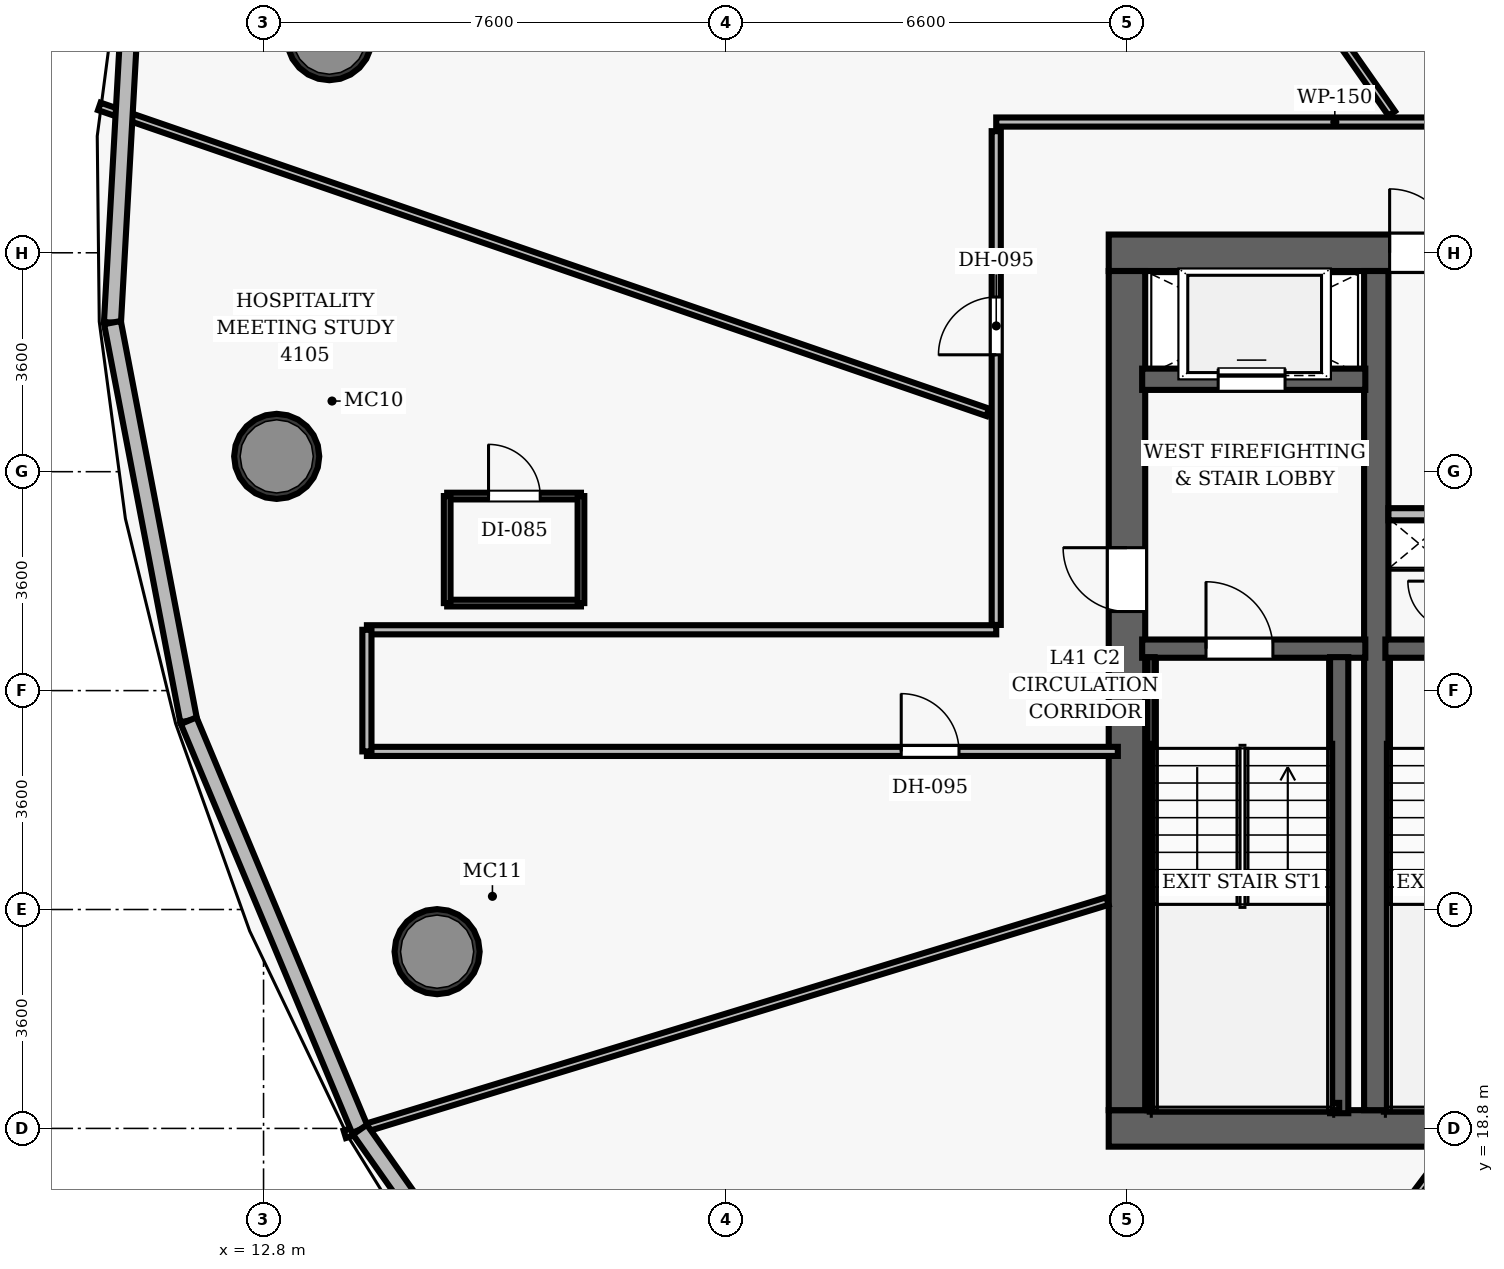
"""IFC4 building model, lengths in metres.
Left out: names, types, materials, properties, quantities, classifications, styles, units other than length and angle.
Written with IfcOpenShell. Run it as: python <this file> out.ifc"""

import sys

from ifc_helpers import new_model, si_unit, direction, frame, frame_2d, origin, origin_2d, place, context, subcontext, project, spatial, rectangle, hollow_circle, extrude, element, fill, save


model = new_model("IFC4")
c1 = context("Model", 3, precision=1e-05, world=origin(), true_north=direction((0.0, 1.0)))
c2 = subcontext(c1, "Body", "Model", "MODEL_VIEW")
j1 = project(units=[si_unit("LENGTHUNIT", "METRE"), si_unit("PLANEANGLEUNIT", "RADIAN")], contexts=[c1])
p1 = place(None, origin())
s1 = spatial("IfcSite", under=j1, at=p1, CompositionType="ELEMENT")
p2 = place(p1, origin())
s2 = spatial("IfcBuilding", under=s1, at=p2, CompositionType="ELEMENT")
p3 = place(p2, frame((0.0, 0.0, 162.3)))
s3 = spatial("IfcBuildingStorey", under=s2, at=p3, CompositionType="ELEMENT", Elevation=162.3)
p4 = place(p3, frame((26.7, 18.8, 0.0), z_axis=(0.0, 0.0, 1.0), x_axis=(1.0, 0.0, 0.0)))
e1 = element("IfcWall", 1, at=p4, inside=s3, PredefinedType="SHEAR", context=c2, shape_type="SweptSolid", body=[
    extrude(rectangle(XDim=22.6, YDim=0.6, at=frame_2d((11.3, 0.0))), origin(), (0.0, 0.0, 1.0), 3.5),
])
p5 = place(p4, frame((14.52, 0.0, 0.0)))
e2 = element("IfcOpeningElement", 2, at=p5, cuts=e1, PredefinedType="OPENING", context=c2, shape_type="SweptSolid", body=[
    extrude(rectangle(XDim=1.05, YDim=2.15, at=frame_2d((0.525, 1.075))), frame((0.0, 0.31, 0.0), z_axis=(0.0, -1.0, 0.0), x_axis=(1.0, 0.0, 0.0)), (0.0, 0.0, 1.0), 0.62),
])
p6 = place(p3, frame((26.7, 33.2, 0.0), z_axis=(0.0, 0.0, 1.0), x_axis=(1.0, 0.0, 0.0)))
e3 = element("IfcWall", 3, at=p6, inside=s3, PredefinedType="SHEAR", context=c2, shape_type="SweptSolid", body=[
    extrude(rectangle(XDim=22.6, YDim=0.6, at=frame_2d((11.3, 0.0))), origin(), (0.0, 0.0, 1.0), 3.5),
])
p7 = place(p6, frame((4.62, 0.0, 0.0)))
e4 = element("IfcOpeningElement", 4, at=p7, cuts=e3, PredefinedType="OPENING", context=c2, shape_type="SweptSolid", body=[
    extrude(rectangle(XDim=1.05, YDim=2.15, at=frame_2d((0.525, 1.075))), frame((0.0, 0.31, 0.0), z_axis=(0.0, -1.0, 0.0), x_axis=(1.0, 0.0, 0.0)), (0.0, 0.0, 1.0), 0.62),
])
p8 = place(p6, frame((14.52, 0.0, 0.0)))
e5 = element("IfcOpeningElement", 5, at=p8, cuts=e3, PredefinedType="OPENING", context=c2, shape_type="SweptSolid", body=[
    extrude(rectangle(XDim=1.05, YDim=2.15, at=frame_2d((0.525, 1.075))), frame((0.0, 0.31, 0.0), z_axis=(0.0, -1.0, 0.0), x_axis=(1.0, 0.0, 0.0)), (0.0, 0.0, 1.0), 0.62),
])
p9 = place(p3, frame((27.0, 19.1, 0.0), z_axis=(0.0, 0.0, 1.0), x_axis=(0.0, 1.0, 0.0)))
e6 = element("IfcWall", 6, at=p9, inside=s3, PredefinedType="SHEAR", context=c2, shape_type="SweptSolid", body=[
    extrude(rectangle(XDim=13.8, YDim=0.6, at=frame_2d((6.9, 0.0))), origin(), (0.0, 0.0, 1.0), 3.5),
])
p10 = place(p9, frame((8.2, 0.0, 0.0)))
e7 = element("IfcOpeningElement", 7, at=p10, cuts=e6, PredefinedType="OPENING", context=c2, shape_type="SweptSolid", body=[
    extrude(rectangle(XDim=1.05, YDim=2.15, at=frame_2d((0.525, 1.075))), frame((0.0, 0.31, 0.0), z_axis=(0.0, -1.0, 0.0), x_axis=(1.0, 0.0, 0.0)), (0.0, 0.0, 1.0), 0.62),
])
p11 = place(p3, frame((31.1, 19.1, 0.0), z_axis=(0.0, 0.0, 1.0), x_axis=(0.0, 1.0, 0.0)))
e8 = element("IfcWall", 8, at=p11, inside=s3, PredefinedType="SHEAR", context=c2, shape_type="SweptSolid", body=[
    extrude(rectangle(XDim=13.8, YDim=0.4, at=frame_2d((6.9, 0.0))), origin(), (0.0, 0.0, 1.0), 3.5),
])
for number, where, z_axis, x_axis in (
    (9, (13.882, 36.738, 0.0), (0.0, 0.0, 1.0), (1.0, 0.0, 0.0)),
    (10, (13.016, 29.852, 0.0), (0.0, 0.0, 1.0), (1.0, 0.0, 0.0)),
    (11, (15.654, 21.707, 0.0), (0.0, 0.0, 1.0), (1.0, 0.0, 0.0)),
):
    element("IfcColumn", number, at=place(p3, frame(where, z_axis=z_axis, x_axis=x_axis)), inside=s3, PredefinedType="COLUMN", context=c2, shape_type="SweptSolid", body=[
        extrude(hollow_circle(Radius=0.7, WallThickness=0.055, at=origin_2d()), origin(), (0.0, 0.0, 1.0), 3.5),
    ])
p12 = place(p3, frame((27.25, 26.69, 0.0), z_axis=(0.0, 0.0, 1.0), x_axis=(1.0, 0.0, 0.0)))
e12 = element("IfcWall", 12, at=p12, inside=s3, PredefinedType="SHEAR", context=c2, shape_type="SweptSolid", body=[
    extrude(rectangle(XDim=3.67, YDim=0.3, at=frame_2d((1.835, 0.0))), origin(), (0.0, 0.0, 1.0), 3.5),
])
p13 = place(p12, frame((1.05, 0.0, 0.0)))
e13 = element("IfcOpeningElement", 13, at=p13, cuts=e12, PredefinedType="OPENING", context=c2, shape_type="SweptSolid", body=[
    extrude(rectangle(XDim=1.1, YDim=2.15, at=frame_2d((0.55, 1.075))), frame((0.0, 0.16, 0.0), z_axis=(0.0, -1.0, 0.0), x_axis=(1.0, 0.0, 0.0)), (0.0, 0.0, 1.0), 0.32),
])
p14 = place(p3, frame((30.49, 19.05, 0.0), z_axis=(0.0, 0.0, 1.0), x_axis=(0.0, 1.0, 0.0)))
e14 = element("IfcWall", 14, at=p14, inside=s3, PredefinedType="SHEAR", context=c2, shape_type="SweptSolid", body=[
    extrude(rectangle(XDim=7.5, YDim=0.3, at=frame_2d((3.75, 0.0))), origin(), (0.0, 0.0, 1.0), 3.5),
])
p15 = place(p3, frame((27.395, 19.1, 0.0), z_axis=(0.0, 0.0, 1.0), x_axis=(0.0, 1.0, 0.0)))
e15 = element("IfcWall", 15, at=p15, inside=s3, PredefinedType="SHEAR", context=c2, shape_type="SweptSolid", body=[
    extrude(rectangle(XDim=7.45, YDim=0.12, at=frame_2d((3.725, 0.0))), origin(), (0.0, 0.0, 1.0), 3.5),
])
p16 = place(p3, frame((27.395, 19.16, 0.0), z_axis=(0.0, 0.0, 1.0), x_axis=(1.0, 0.0, 0.0)))
e16 = element("IfcWall", 16, at=p16, inside=s3, PredefinedType="SHEAR", context=c2, shape_type="SweptSolid", body=[
    extrude(rectangle(XDim=3.095, YDim=0.12, at=frame_2d((1.547, 0.0))), origin(), (0.0, 0.0, 1.0), 3.5),
])
p17 = place(p3, frame((27.25, 31.12, 0.0), z_axis=(0.0, 0.0, 1.0), x_axis=(1.0, 0.0, 0.0)))
e17 = element("IfcWall", 17, at=p17, inside=s3, PredefinedType="SHEAR", context=c2, shape_type="SweptSolid", body=[
    extrude(rectangle(XDim=3.67, YDim=0.35, at=frame_2d((1.835, 0.0))), origin(), (0.0, 0.0, 1.0), 2.565),
])
p18 = place(p17, frame((1.25, 0.0, 0.0)))
e18 = element("IfcOpeningElement", 18, at=p18, cuts=e17, PredefinedType="OPENING", context=c2, shape_type="SweptSolid", body=[
    extrude(rectangle(XDim=1.1, YDim=2.15, at=frame_2d((0.55, 1.075))), frame((0.0, 0.185, 0.0), z_axis=(0.0, -1.0, 0.0), x_axis=(1.0, 0.0, 0.0)), (0.0, 0.0, 1.0), 0.37),
])
p19 = place(p3, frame((31.25, 26.69, 0.0), z_axis=(0.0, 0.0, 1.0), x_axis=(1.0, 0.0, 0.0)))
e19 = element("IfcWall", 19, at=p19, inside=s3, PredefinedType="SHEAR", context=c2, shape_type="SweptSolid", body=[
    extrude(rectangle(XDim=3.56, YDim=0.3, at=frame_2d((1.78, 0.0))), origin(), (0.0, 0.0, 1.0), 3.5),
])
p20 = place(p19, frame((1.55, 0.0, 0.0)))
e20 = element("IfcOpeningElement", 20, at=p20, cuts=e19, PredefinedType="OPENING", context=c2, shape_type="SweptSolid", body=[
    extrude(rectangle(XDim=1.1, YDim=2.15, at=frame_2d((0.55, 1.075))), frame((0.0, 0.16, 0.0), z_axis=(0.0, -1.0, 0.0), x_axis=(1.0, 0.0, 0.0)), (0.0, 0.0, 1.0), 0.32),
])
p21 = place(p3, frame((31.3, 19.16, 0.0), z_axis=(0.0, 0.0, 1.0), x_axis=(1.0, 0.0, 0.0)))
e21 = element("IfcWall", 21, at=p21, inside=s3, PredefinedType="SHEAR", context=c2, shape_type="SweptSolid", body=[
    extrude(rectangle(XDim=3.04, YDim=0.12, at=frame_2d((1.52, 0.0))), origin(), (0.0, 0.0, 1.0), 3.5),
])
p22 = place(p3, frame((31.3, 28.9, 0.0), z_axis=(0.0, 0.0, 1.0), x_axis=(1.0, 0.0, 0.0)))
e22 = element("IfcWall", 22, at=p22, inside=s3, PredefinedType="PARTITIONING", context=c2, shape_type="SweptSolid", body=[
    extrude(rectangle(XDim=1.12, YDim=0.2, at=frame_2d((0.56, 0.0))), origin(), (0.0, 0.0, 1.0), 2.565),
])
p23 = place(p3, frame((24.85, 35.35, 0.0), z_axis=(0.0, 0.0, 1.0), x_axis=(1.0, 0.0, 0.0)))
e23 = element("IfcWall", 23, at=p23, inside=s3, PredefinedType="PARTITIONING", context=c2, shape_type="SweptSolid", body=[
    extrude(rectangle(XDim=26.0, YDim=0.15, at=frame_2d((13.0, 0.0))), origin(), (0.0, 0.0, 1.0), 2.565),
])
p24 = place(p23, frame((21.017, 0.0, 0.0)))
e24 = element("IfcOpeningElement", 24, at=p24, cuts=e23, PredefinedType="OPENING", context=c2, shape_type="SweptSolid", body=[
    extrude(rectangle(XDim=0.95, YDim=2.15, at=frame_2d((0.475, 1.075))), frame((0.0, 0.085, 0.0), z_axis=(0.0, -1.0, 0.0), x_axis=(1.0, 0.0, 0.0)), (0.0, 0.0, 1.0), 0.17),
])
p25 = place(p23, frame((14.438, 0.0, 0.0)))
e25 = element("IfcOpeningElement", 25, at=p25, cuts=e23, PredefinedType="OPENING", context=c2, shape_type="SweptSolid", body=[
    extrude(rectangle(XDim=0.95, YDim=2.15, at=frame_2d((0.475, 1.075))), frame((0.0, 0.085, 0.0), z_axis=(0.0, -1.0, 0.0), x_axis=(1.0, 0.0, 0.0)), (0.0, 0.0, 1.0), 0.17),
])
p26 = place(p23, frame((11.287, 0.0, 0.0)))
e26 = element("IfcOpeningElement", 26, at=p26, cuts=e23, PredefinedType="OPENING", context=c2, shape_type="SweptSolid", body=[
    extrude(rectangle(XDim=0.95, YDim=2.15, at=frame_2d((0.475, 1.075))), frame((0.0, 0.085, 0.0), z_axis=(0.0, -1.0, 0.0), x_axis=(1.0, 0.0, 0.0)), (0.0, 0.0, 1.0), 0.17),
])
p27 = place(p3, frame((24.85, 27.08, 0.0), z_axis=(0.0, 0.0, 1.0), x_axis=(0.0, 1.0, 0.0)))
e27 = element("IfcWall", 27, at=p27, inside=s3, PredefinedType="PARTITIONING", context=c2, shape_type="SweptSolid", body=[
    extrude(rectangle(XDim=8.12, YDim=0.15, at=frame_2d((4.06, 0.0))), origin(), (0.0, 0.0, 1.0), 2.565),
])
p28 = place(p27, frame((4.442, 0.0, 0.0)))
e28 = element("IfcOpeningElement", 28, at=p28, cuts=e27, PredefinedType="OPENING", context=c2, shape_type="SweptSolid", body=[
    extrude(rectangle(XDim=0.95, YDim=2.15, at=frame_2d((0.475, 1.075))), frame((0.0, 0.085, 0.0), z_axis=(0.0, -1.0, 0.0), x_axis=(1.0, 0.0, 0.0)), (0.0, 0.0, 1.0), 0.17),
])
p29 = place(p3, frame((14.5, 27.0, 0.0), z_axis=(0.0, 0.0, 1.0), x_axis=(1.0, 0.0, 0.0)))
e29 = element("IfcWall", 29, at=p29, inside=s3, PredefinedType="PARTITIONING", context=c2, shape_type="SweptSolid", body=[
    extrude(rectangle(XDim=10.35, YDim=0.15, at=frame_2d((5.175, 0.0))), origin(), (0.0, 0.0, 1.0), 2.565),
])
p30 = place(p3, frame((14.5, 25.0, 0.0), z_axis=(0.0, 0.0, 1.0), x_axis=(1.0, 0.0, 0.0)))
e30 = element("IfcWall", 30, at=p30, inside=s3, PredefinedType="PARTITIONING", context=c2, shape_type="SweptSolid", body=[
    extrude(rectangle(XDim=12.35, YDim=0.15, at=frame_2d((6.175, 0.0))), origin(), (0.0, 0.0, 1.0), 2.565),
])
p31 = place(p30, frame((8.788, 0.0, 0.0)))
e31 = element("IfcOpeningElement", 31, at=p31, cuts=e30, PredefinedType="OPENING", context=c2, shape_type="SweptSolid", body=[
    extrude(rectangle(XDim=0.95, YDim=2.15, at=frame_2d((0.475, 1.075))), frame((0.0, 0.085, 0.0), z_axis=(0.0, -1.0, 0.0), x_axis=(1.0, 0.0, 0.0)), (0.0, 0.0, 1.0), 0.17),
])
p32 = place(p3, frame((14.5, 25.0, 0.0), z_axis=(0.0, 0.0, 1.0), x_axis=(0.0, 1.0, 0.0)))
e32 = element("IfcWall", 32, at=p32, inside=s3, PredefinedType="PARTITIONING", context=c2, shape_type="SweptSolid", body=[
    extrude(rectangle(XDim=2.0, YDim=0.15, at=frame_2d((1.0, 0.0))), origin(), (0.0, 0.0, 1.0), 2.565),
])
p33 = place(p3, frame((31.355, 35.49, 0.0), z_axis=(0.0, 0.0, 1.0), x_axis=(-0.573576982677, 0.819151661747, 0.0)))
e33 = element("IfcWall", 33, at=p33, inside=s3, PredefinedType="PARTITIONING", context=c2, shape_type="SweptSolid", body=[
    extrude(rectangle(XDim=16.865, YDim=0.13, at=frame_2d((8.433, 0.0))), origin(), (0.0, 0.0, 1.0), 2.565),
])
p34 = place(p3, frame((24.71, 30.576, 0.0), z_axis=(0.0, 0.0, 1.0), x_axis=(-0.945518452422, 0.32556851219, 0.0)))
e34 = element("IfcWall", 34, at=p34, inside=s3, PredefinedType="PARTITIONING", context=c2, shape_type="SweptSolid", body=[
    extrude(rectangle(XDim=15.453, YDim=0.13, at=frame_2d((7.727, 0.0))), origin(), (0.0, 0.0, 1.0), 2.565),
])
p35 = place(p3, frame((26.68, 22.539, 0.0), z_axis=(0.0, 0.0, 1.0), x_axis=(-0.95630705824, -0.292364174208, 0.0)))
e35 = element("IfcWall", 35, at=p35, inside=s3, PredefinedType="PARTITIONING", context=c2, shape_type="SweptSolid", body=[
    extrude(rectangle(XDim=13.117, YDim=0.13, at=frame_2d((6.559, 0.0))), origin(), (0.0, 0.0, 1.0), 2.565),
])
p36 = place(p3, frame((32.333, 18.48, 0.0), z_axis=(0.0, 0.0, 1.0), x_axis=(-0.601812874522, -0.798637129151, 0.0)))
e36 = element("IfcWall", 36, at=p36, inside=s3, PredefinedType="PARTITIONING", context=c2, shape_type="SweptSolid", body=[
    extrude(rectangle(XDim=13.649, YDim=0.13, at=frame_2d((6.825, 0.0))), origin(), (0.0, 0.0, 1.0), 2.565),
])
p37 = place(p3, frame((15.82, 27.439, 0.0), z_axis=(0.0, 0.0, 1.0), x_axis=(1.0, 0.0, 0.0)))
e37 = element("IfcWall", 37, at=p37, inside=s3, PredefinedType="PARTITIONING", context=c2, shape_type="SweptSolid", body=[
    extrude(rectangle(XDim=2.2, YDim=0.11, at=frame_2d((1.1, 0.0))), origin(), (0.0, 0.0, 1.0), 2.565),
])
p38 = place(p3, frame((15.82, 29.199, 0.0), z_axis=(0.0, 0.0, 1.0), x_axis=(1.0, 0.0, 0.0)))
e38 = element("IfcWall", 38, at=p38, inside=s3, PredefinedType="PARTITIONING", context=c2, shape_type="SweptSolid", body=[
    extrude(rectangle(XDim=2.2, YDim=0.11, at=frame_2d((1.1, 0.0))), origin(), (0.0, 0.0, 1.0), 2.565),
])
p39 = place(p38, frame((0.68, 0.0, 0.0)))
e39 = element("IfcOpeningElement", 39, at=p39, cuts=e38, PredefinedType="OPENING", context=c2, shape_type="SweptSolid", body=[
    extrude(rectangle(XDim=0.85, YDim=2.1, at=frame_2d((0.425, 1.05))), frame((0.0, 0.065, 0.0), z_axis=(0.0, -1.0, 0.0), x_axis=(1.0, 0.0, 0.0)), (0.0, 0.0, 1.0), 0.13),
])
for number, where, z_axis, x_axis in (
    (40, (15.82, 27.439, 0.0), (0.0, 0.0, 1.0), (0.0, 1.0, 0.0)),
    (41, (18.02, 27.439, 0.0), (0.0, 0.0, 1.0), (0.0, 1.0, 0.0)),
):
    element("IfcWall", number, at=place(p3, frame(where, z_axis=z_axis, x_axis=x_axis)), inside=s3, PredefinedType="PARTITIONING", context=c2, shape_type="SweptSolid", body=[
        extrude(rectangle(XDim=1.76, YDim=0.11, at=frame_2d((0.88, 0.0))), origin(), (0.0, 0.0, 1.0), 2.565),
    ])
p40 = place(p3, frame((10.315, 32.052, 0.0), z_axis=(0.0, 0.0, 1.0), x_axis=(0.055932126185, 0.99843457335, 0.0)))
e42 = element("IfcWall", 42, at=p40, inside=s3, PredefinedType="SOLIDWALL", context=c2, shape_type="SweptSolid", body=[
    extrude(rectangle(XDim=5.823, YDim=0.28, at=frame_2d((2.911, 0.0))), origin(), (0.0, 0.0, 1.0), 3.15),
])
p41 = place(p3, frame((11.568, 25.506, 0.0), z_axis=(0.0, 0.0, 1.0), x_axis=(-0.188022651866, 0.982164692088, 0.0)))
e43 = element("IfcWall", 43, at=p41, inside=s3, PredefinedType="SOLIDWALL", context=c2, shape_type="SweptSolid", body=[
    extrude(rectangle(XDim=6.665, YDim=0.28, at=frame_2d((3.333, 0.0))), origin(), (0.0, 0.0, 1.0), 3.15),
])
p42 = place(p3, frame((14.385, 18.78, 0.0), z_axis=(0.0, 0.0, 1.0), x_axis=(-0.3862765553, 0.922383013084, 0.0)))
e44 = element("IfcWall", 44, at=p42, inside=s3, PredefinedType="SOLIDWALL", context=c2, shape_type="SweptSolid", body=[
    extrude(rectangle(XDim=7.292, YDim=0.28, at=frame_2d((3.646, 0.0))), origin(), (0.0, 0.0, 1.0), 3.15),
])
p43 = place(p3, frame((18.743, 12.591, 0.0), z_axis=(0.0, 0.0, 1.0), x_axis=(-0.575733066799, 0.817637716715, 0.0)))
e45 = element("IfcWall", 45, at=p43, inside=s3, PredefinedType="SOLIDWALL", context=c2, shape_type="SweptSolid", body=[
    extrude(rectangle(XDim=7.569, YDim=0.28, at=frame_2d((3.785, 0.0))), origin(), (0.0, 0.0, 1.0), 3.15),
])
p44 = place(p13, origin())
e46 = element("IfcDoor", 46, at=p44, inside=s3, OperationType="SINGLE_SWING_LEFT", PredefinedType="DOOR", context=c2, shape_type="SweptSolid", body=[
    extrude(rectangle(XDim=1.1, YDim=2.15, at=frame_2d((0.55, 1.075))), frame((0.0, 0.025, 0.0), z_axis=(0.0, -1.0, 0.0), x_axis=(1.0, 0.0, 0.0)), (0.0, 0.0, 1.0), 0.05),
])
fill(e13, e46)
p45 = place(p10, origin())
e47 = element("IfcDoor", 47, at=p45, inside=s3, OperationType="SINGLE_SWING_RIGHT", PredefinedType="DOOR", context=c2, shape_type="SweptSolid", body=[
    extrude(rectangle(XDim=1.05, YDim=2.15, at=frame_2d((0.525, 1.075))), frame((0.0, 0.025, 0.0), z_axis=(0.0, -1.0, 0.0), x_axis=(1.0, 0.0, 0.0)), (0.0, 0.0, 1.0), 0.05),
])
fill(e7, e47)
p46 = place(p7, origin())
e48 = element("IfcDoor", 48, at=p46, inside=s3, OperationType="SINGLE_SWING_LEFT", PredefinedType="DOOR", context=c2, shape_type="SweptSolid", body=[
    extrude(rectangle(XDim=1.05, YDim=2.15, at=frame_2d((0.525, 1.075))), frame((0.0, 0.025, 0.0), z_axis=(0.0, -1.0, 0.0), x_axis=(1.0, 0.0, 0.0)), (0.0, 0.0, 1.0), 0.05),
])
fill(e4, e48)
p47 = place(p28, origin())
e49 = element("IfcDoor", 49, at=p47, inside=s3, OperationType="SINGLE_SWING_LEFT", PredefinedType="DOOR", context=c2, shape_type="SweptSolid", body=[
    extrude(rectangle(XDim=0.95, YDim=2.15, at=frame_2d((0.475, 1.075))), frame((0.0, 0.025, 0.0), z_axis=(0.0, -1.0, 0.0), x_axis=(1.0, 0.0, 0.0)), (0.0, 0.0, 1.0), 0.05),
])
fill(e28, e49)
p48 = place(p31, origin())
e50 = element("IfcDoor", 50, at=p48, inside=s3, OperationType="SINGLE_SWING_LEFT", PredefinedType="DOOR", context=c2, shape_type="SweptSolid", body=[
    extrude(rectangle(XDim=0.95, YDim=2.15, at=frame_2d((0.475, 1.075))), frame((0.0, 0.025, 0.0), z_axis=(0.0, -1.0, 0.0), x_axis=(1.0, 0.0, 0.0)), (0.0, 0.0, 1.0), 0.05),
])
fill(e31, e50)
p49 = place(p39, origin())
e51 = element("IfcDoor", 51, at=p49, inside=s3, OperationType="SINGLE_SWING_LEFT", PredefinedType="DOOR", context=c2, shape_type="SweptSolid", body=[
    extrude(rectangle(XDim=0.85, YDim=2.1, at=frame_2d((0.425, 1.05))), frame((0.0, 0.025, 0.0), z_axis=(0.0, -1.0, 0.0), x_axis=(1.0, 0.0, 0.0)), (0.0, 0.0, 1.0), 0.05),
])
fill(e39, e51)
p50 = place(p18, origin())
e52 = element("IfcDoor", 52, at=p50, inside=s3, OperationType="SLIDING_TO_LEFT", PredefinedType="DOOR", context=c2, shape_type="SweptSolid", body=[
    extrude(rectangle(XDim=1.1, YDim=2.15, at=frame_2d((0.55, 1.075))), frame((0.0, 0.025, 0.0), z_axis=(0.0, -1.0, 0.0), x_axis=(1.0, 0.0, 0.0)), (0.0, 0.0, 1.0), 0.05),
])
fill(e18, e52)
save(model, sys.argv[1])
